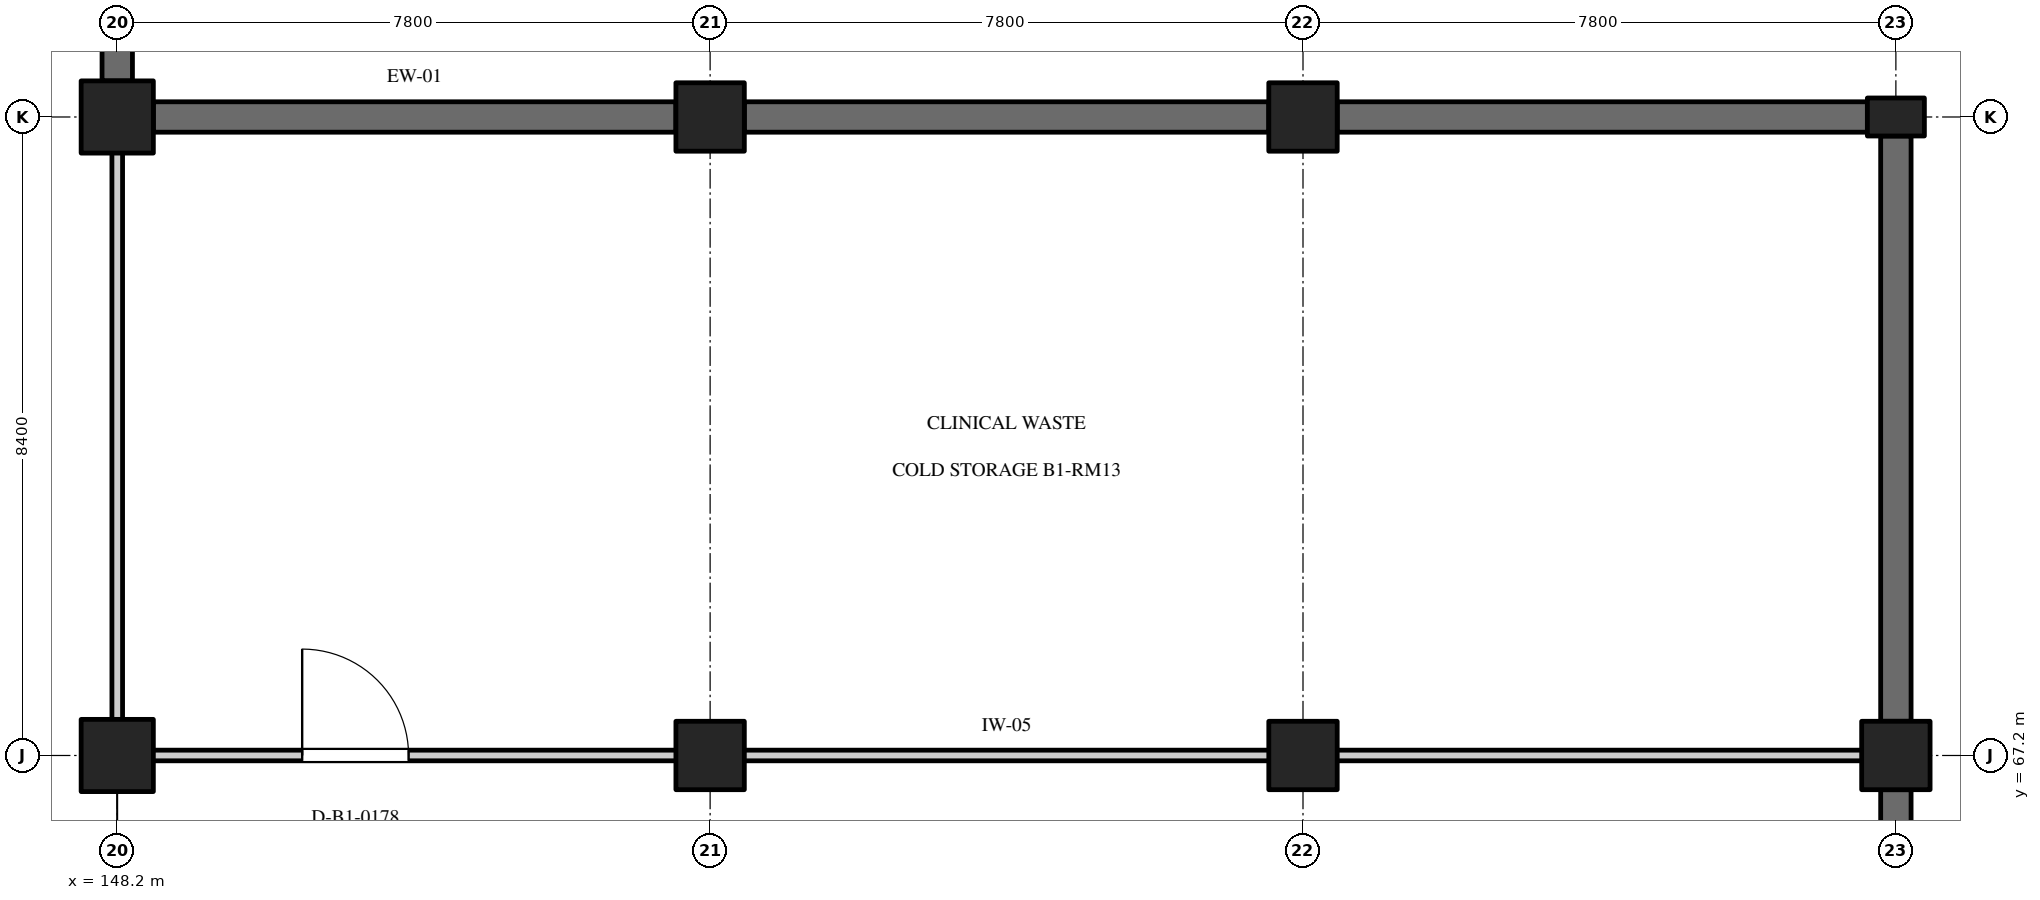
"""IFC4 building model, lengths in metres.
Left out: names, types, materials, properties, quantities, classifications, styles, units other than length and angle.
Written with IfcOpenShell. Run it as: python <this file> out.ifc"""

import sys

from ifc_helpers import new_model, si_unit, direction, frame, frame_2d, origin, origin_2d, place, context, subcontext, project, spatial, rectangle, extrude, element, fill, save


model = new_model("IFC4")
c1 = context("Model", 3, precision=1e-05, world=origin(), true_north=direction((0.0, 1.0)))
c2 = subcontext(c1, "Body", "Model", "MODEL_VIEW")
j1 = project(units=[si_unit("LENGTHUNIT", "METRE"), si_unit("PLANEANGLEUNIT", "RADIAN")], contexts=[c1])
p1 = place(None, origin())
s1 = spatial("IfcSite", under=j1, at=p1, CompositionType="ELEMENT")
p2 = place(p1, origin())
s2 = spatial("IfcBuilding", under=s1, at=p2, CompositionType="ELEMENT")
p3 = place(p2, frame((0.0, 0.0, -4.5)))
s3 = spatial("IfcBuildingStorey", under=s2, at=p3, CompositionType="ELEMENT", Elevation=-4.5)
for number, where, z_axis, x_axis in (
    (1, (148.2, 67.2, 0.0), (0.0, 0.0, 1.0), (1.0, 0.0, 0.0)),
    (2, (148.2, 75.6, 0.0), (0.0, 0.0, 1.0), (1.0, 0.0, 0.0)),
):
    element("IfcColumn", number, at=place(p3, frame(where, z_axis=z_axis, x_axis=x_axis)), inside=s3, PredefinedType="COLUMN", context=c2, shape_type="SweptSolid", body=[
        extrude(rectangle(XDim=0.95, YDim=0.95, at=origin_2d()), origin(), (0.0, 0.0, 1.0), 4.5),
    ])
for number, where, z_axis, x_axis in (
    (3, (156.0, 67.2, 0.0), (0.0, 0.0, 1.0), (1.0, 0.0, 0.0)),
    (4, (156.0, 75.6, 0.0), (0.0, 0.0, 1.0), (1.0, 0.0, 0.0)),
    (5, (163.8, 67.2, 0.0), (0.0, 0.0, 1.0), (1.0, 0.0, 0.0)),
    (6, (163.8, 75.6, 0.0), (0.0, 0.0, 1.0), (1.0, 0.0, 0.0)),
    (7, (171.6, 67.2, 0.0), (0.0, 0.0, 1.0), (1.0, 0.0, 0.0)),
):
    element("IfcColumn", number, at=place(p3, frame(where, z_axis=z_axis, x_axis=x_axis)), inside=s3, PredefinedType="COLUMN", context=c2, shape_type="SweptSolid", body=[
        extrude(rectangle(XDim=0.9, YDim=0.9, at=origin_2d()), origin(), (0.0, 0.0, 1.0), 4.5),
    ])
p4 = place(p3, frame((171.6, 75.6, 0.0), z_axis=(0.0, 0.0, 1.0), x_axis=(0.0, 1.0, 0.0)))
e8 = element("IfcColumn", 8, at=p4, inside=s3, PredefinedType="PILASTER", context=c2, shape_type="SweptSolid", body=[
    extrude(rectangle(XDim=0.5, YDim=0.75, at=origin_2d()), origin(), (0.0, 0.0, 1.0), 4.5),
])
p5 = place(p3, frame((148.675, 75.6, 0.0), z_axis=(0.0, 0.0, 1.0), x_axis=(1.0, 0.0, 0.0)))
e9 = element("IfcWall", 9, at=p5, inside=s3, PredefinedType="SOLIDWALL", context=c2, shape_type="SweptSolid", body=[
    extrude(rectangle(XDim=6.875, YDim=0.4, at=frame_2d((3.438, 0.0))), origin(), (0.0, 0.0, 1.0), 3.45),
])
p6 = place(p3, frame((156.45, 75.6, 0.0), z_axis=(0.0, 0.0, 1.0), x_axis=(1.0, 0.0, 0.0)))
e10 = element("IfcWall", 10, at=p6, inside=s3, PredefinedType="SOLIDWALL", context=c2, shape_type="SweptSolid", body=[
    extrude(rectangle(XDim=6.9, YDim=0.4, at=frame_2d((3.45, 0.0))), origin(), (0.0, 0.0, 1.0), 3.45),
])
p7 = place(p3, frame((164.25, 75.6, 0.0), z_axis=(0.0, 0.0, 1.0), x_axis=(1.0, 0.0, 0.0)))
e11 = element("IfcWall", 11, at=p7, inside=s3, PredefinedType="SOLIDWALL", context=c2, shape_type="SweptSolid", body=[
    extrude(rectangle(XDim=6.975, YDim=0.4, at=frame_2d((3.488, 0.0))), origin(), (0.0, 0.0, 1.0), 3.45),
])
p8 = place(p3, frame((148.2, 76.075, 0.0), z_axis=(0.0, 0.0, 1.0), x_axis=(0.0, 1.0, 0.0)))
e12 = element("IfcWall", 12, at=p8, inside=s3, PredefinedType="SOLIDWALL", context=c2, shape_type="SweptSolid", body=[
    extrude(rectangle(XDim=7.45, YDim=0.4, at=frame_2d((3.725, 0.0))), origin(), (0.0, 0.0, 1.0), 3.45),
])
p9 = place(p3, frame((171.6, 59.05, 0.0), z_axis=(0.0, 0.0, 1.0), x_axis=(0.0, 1.0, 0.0)))
e13 = element("IfcWall", 13, at=p9, inside=s3, PredefinedType="SOLIDWALL", context=c2, shape_type="SweptSolid", body=[
    extrude(rectangle(XDim=7.7, YDim=0.4, at=frame_2d((3.85, 0.0))), origin(), (0.0, 0.0, 1.0), 3.45),
])
p10 = place(p3, frame((171.6, 67.65, 0.0), z_axis=(0.0, 0.0, 1.0), x_axis=(0.0, 1.0, 0.0)))
e14 = element("IfcWall", 14, at=p10, inside=s3, PredefinedType="SOLIDWALL", context=c2, shape_type="SweptSolid", body=[
    extrude(rectangle(XDim=7.7, YDim=0.4, at=frame_2d((3.85, 0.0))), origin(), (0.0, 0.0, 1.0), 3.45),
])
p11 = place(p3, frame((148.285, 67.2, 0.0), z_axis=(0.0, 0.0, 1.0), x_axis=(1.0, 0.0, 0.0)))
e15 = element("IfcWall", 15, at=p11, inside=s3, PredefinedType="PARTITIONING", context=c2, shape_type="SweptSolid", body=[
    extrude(rectangle(XDim=23.23, YDim=0.14, at=frame_2d((11.615, 0.0))), origin(), (0.0, 0.0, 1.0), 4.13),
])
p12 = place(p11, frame((2.348, 0.0, 0.0)))
e16 = element("IfcOpeningElement", 16, at=p12, cuts=e15, PredefinedType="OPENING", context=c2, shape_type="SweptSolid", body=[
    extrude(rectangle(XDim=1.4, YDim=2.25, at=frame_2d((0.7, 1.125))), frame((0.0, 0.082, 0.0), z_axis=(0.0, -1.0, 0.0), x_axis=(1.0, 0.0, 0.0)), (0.0, 0.0, 1.0), 0.164),
])
p13 = place(p3, frame((155.59, 75.6, 0.0), z_axis=(0.0, 0.0, 1.0), x_axis=(1.0, 0.0, 0.0)))
e17 = element("IfcWall", 17, at=p13, inside=s3, PredefinedType="PARTITIONING", context=c2, shape_type="SweptSolid", body=[
    extrude(rectangle(XDim=0.82, YDim=0.14, at=frame_2d((0.41, 0.0))), origin(), (0.0, 0.0, 1.0), 3.4),
])
p14 = place(p3, frame((163.39, 75.6, 0.0), z_axis=(0.0, 0.0, 1.0), x_axis=(1.0, 0.0, 0.0)))
e18 = element("IfcWall", 18, at=p14, inside=s3, PredefinedType="PARTITIONING", context=c2, shape_type="SweptSolid", body=[
    extrude(rectangle(XDim=0.82, YDim=0.14, at=frame_2d((0.41, 0.0))), origin(), (0.0, 0.0, 1.0), 3.4),
])
p15 = place(p3, frame((148.2, 67.285, 0.0), z_axis=(0.0, 0.0, 1.0), x_axis=(0.0, 1.0, 0.0)))
e19 = element("IfcWall", 19, at=p15, inside=s3, PredefinedType="PARTITIONING", context=c2, shape_type="SweptSolid", body=[
    extrude(rectangle(XDim=8.23, YDim=0.14, at=frame_2d((4.115, 0.0))), origin(), (0.0, 0.0, 1.0), 3.4),
])
p16 = place(p12, origin())
e20 = element("IfcDoor", 20, at=p16, inside=s3, OperationType="SINGLE_SWING_LEFT", PredefinedType="DOOR", context=c2, shape_type="SweptSolid", body=[
    extrude(rectangle(XDim=1.4, YDim=2.25, at=frame_2d((0.7, 1.125))), frame((0.0, 0.025, 0.0), z_axis=(0.0, -1.0, 0.0), x_axis=(1.0, 0.0, 0.0)), (0.0, 0.0, 1.0), 0.05),
])
fill(e16, e20)
save(model, sys.argv[1])
